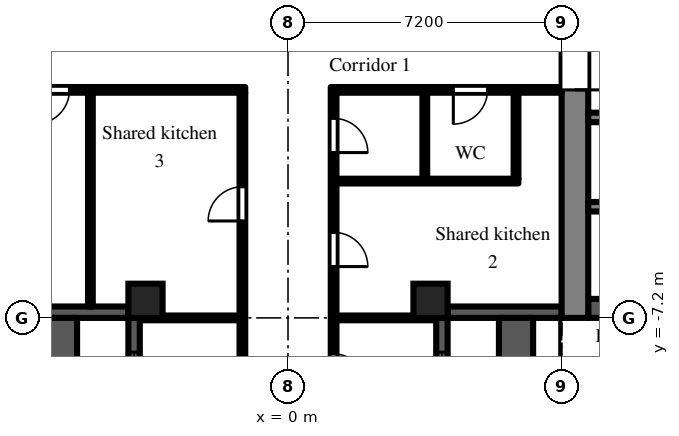
"""IFC4 building model, lengths in metres.
Left out: names, types, materials, properties, quantities, classifications, styles, units other than length and angle.
Written with IfcOpenShell. Run it as: python <this file> out.ifc"""

import sys

from ifc_helpers import new_model, si_unit, direction, frame, frame_2d, origin, origin_2d, place, context, subcontext, project, spatial, rectangle, extrude, element, fill, save


model = new_model("IFC4")
c1 = context("Model", 3, precision=1e-05, world=origin(), true_north=direction((0.0, 1.0)))
c2 = subcontext(c1, "Body", "Model", "MODEL_VIEW")
j1 = project(units=[si_unit("LENGTHUNIT", "METRE"), si_unit("PLANEANGLEUNIT", "RADIAN")], contexts=[c1])
p1 = place(None, origin())
s1 = spatial("IfcSite", under=j1, at=p1, CompositionType="ELEMENT")
p2 = place(p1, origin())
s2 = spatial("IfcBuilding", under=s1, at=p2, CompositionType="ELEMENT")
p3 = place(p2, frame((0.0, 0.0, 93.9)))
s3 = spatial("IfcBuildingStorey", under=s2, at=p3, CompositionType="ELEMENT", Elevation=93.9)
for number, where, z_axis, x_axis in (
    (1, (-3.75, -6.75, 0.0), (0.0, 0.0, 1.0), (1.0, 0.0, 0.0)),
    (2, (3.75, -6.75, 0.0), (0.0, 0.0, 1.0), (1.0, 0.0, 0.0)),
):
    element("IfcColumn", number, at=place(p3, frame(where, z_axis=z_axis, x_axis=x_axis)), inside=s3, PredefinedType="COLUMN", context=c2, shape_type="SweptSolid", body=[
        extrude(rectangle(XDim=0.9, YDim=0.9, at=origin_2d()), origin(), (0.0, 0.0, 1.0), 3.0),
    ])
p4 = place(p3, frame((-7.2, -7.05, 0.0), z_axis=(0.0, 0.0, 1.0), x_axis=(1.0, 0.0, 0.0)))
e3 = element("IfcWall", 3, at=p4, inside=s3, PredefinedType="SOLIDWALL", context=c2, shape_type="SweptSolid", body=[
    extrude(rectangle(XDim=3.0, YDim=0.3, at=frame_2d((1.5, 0.0))), origin(), (0.0, 0.0, 1.0), 2.1),
])
p5 = place(p3, frame((-4.05, -7.2, 0.0), z_axis=(0.0, 0.0, 1.0), x_axis=(0.0, -1.0, 0.0)))
e4 = element("IfcWall", 4, at=p5, inside=s3, PredefinedType="SOLIDWALL", context=c2, shape_type="SweptSolid", body=[
    extrude(rectangle(XDim=7.2, YDim=0.3, at=frame_2d((3.6, 0.0))), origin(), (0.0, 0.0, 1.0), 2.1),
])
p6 = place(p5, frame((3.0, 0.0, 0.0)))
e5 = element("IfcOpeningElement", 5, at=p6, cuts=e4, PredefinedType="OPENING", context=c2, shape_type="SweptSolid", body=[
    extrude(rectangle(XDim=1.2, YDim=2.05, at=frame_2d((0.6, 1.025))), frame((0.0, 0.16, 0.0), z_axis=(0.0, -1.0, 0.0), x_axis=(1.0, 0.0, 0.0)), (0.0, 0.0, 1.0), 0.32),
])
p7 = place(p5, frame((0.9, 0.0, 0.2)))
e6 = element("IfcOpeningElement", 6, at=p7, cuts=e4, PredefinedType="OPENING", context=c2, shape_type="SweptSolid", body=[
    extrude(rectangle(XDim=1.8, YDim=1.85, at=frame_2d((0.9, 0.925))), frame((0.0, 0.16, 0.0), z_axis=(0.0, -1.0, 0.0), x_axis=(1.0, 0.0, 0.0)), (0.0, 0.0, 1.0), 0.32),
])
p8 = place(p5, frame((4.5, 0.0, 0.2)))
e7 = element("IfcOpeningElement", 7, at=p8, cuts=e4, PredefinedType="OPENING", context=c2, shape_type="SweptSolid", body=[
    extrude(rectangle(XDim=1.8, YDim=1.85, at=frame_2d((0.9, 0.925))), frame((0.0, 0.16, 0.0), z_axis=(0.0, -1.0, 0.0), x_axis=(1.0, 0.0, 0.0)), (0.0, 0.0, 1.0), 0.32),
])
p9 = place(p3, frame((4.05, -14.4, 0.0), z_axis=(0.0, 0.0, 1.0), x_axis=(0.0, 1.0, 0.0)))
e8 = element("IfcWall", 8, at=p9, inside=s3, PredefinedType="SOLIDWALL", context=c2, shape_type="SweptSolid", body=[
    extrude(rectangle(XDim=7.2, YDim=0.3, at=frame_2d((3.6, 0.0))), origin(), (0.0, 0.0, 1.0), 2.1),
])
p10 = place(p9, frame((3.0, 0.0, 0.0)))
e9 = element("IfcOpeningElement", 9, at=p10, cuts=e8, PredefinedType="OPENING", context=c2, shape_type="SweptSolid", body=[
    extrude(rectangle(XDim=1.2, YDim=2.05, at=frame_2d((0.6, 1.025))), frame((0.0, 0.16, 0.0), z_axis=(0.0, -1.0, 0.0), x_axis=(1.0, 0.0, 0.0)), (0.0, 0.0, 1.0), 0.32),
])
p11 = place(p9, frame((0.9, 0.0, 0.2)))
e10 = element("IfcOpeningElement", 10, at=p11, cuts=e8, PredefinedType="OPENING", context=c2, shape_type="SweptSolid", body=[
    extrude(rectangle(XDim=1.8, YDim=1.85, at=frame_2d((0.9, 0.925))), frame((0.0, 0.16, 0.0), z_axis=(0.0, -1.0, 0.0), x_axis=(1.0, 0.0, 0.0)), (0.0, 0.0, 1.0), 0.32),
])
p12 = place(p9, frame((4.5, 0.0, 0.2)))
e11 = element("IfcOpeningElement", 11, at=p12, cuts=e8, PredefinedType="OPENING", context=c2, shape_type="SweptSolid", body=[
    extrude(rectangle(XDim=1.8, YDim=1.85, at=frame_2d((0.9, 0.925))), frame((0.0, 0.16, 0.0), z_axis=(0.0, -1.0, 0.0), x_axis=(1.0, 0.0, 0.0)), (0.0, 0.0, 1.0), 0.32),
])
p13 = place(p3, frame((4.2, -7.05, 0.0), z_axis=(0.0, 0.0, 1.0), x_axis=(1.0, 0.0, 0.0)))
e12 = element("IfcWall", 12, at=p13, inside=s3, PredefinedType="SOLIDWALL", context=c2, shape_type="SweptSolid", body=[
    extrude(rectangle(XDim=3.0, YDim=0.3, at=frame_2d((1.5, 0.0))), origin(), (0.0, 0.0, 1.0), 2.1),
])
for number, where, z_axis, x_axis in (
    (13, (6.0, -14.4, 0.0), (0.0, 0.0, 1.0), (0.0, 1.0, 0.0)),
    (14, (-6.0, -14.4, 0.0), (0.0, 0.0, 1.0), (0.0, 1.0, 0.0)),
):
    element("IfcWall", number, at=place(p3, frame(where, z_axis=z_axis, x_axis=x_axis)), inside=s3, PredefinedType="PARAPET", context=c2, shape_type="SweptSolid", body=[
        extrude(rectangle(XDim=7.2, YDim=0.9, at=frame_2d((3.6, 0.0))), origin(), (0.0, 0.0, 1.0), 0.8),
    ])
p14 = place(p3, frame((7.55, -7.2, 0.0), z_axis=(0.0, 0.0, 1.0), x_axis=(0.0, 1.0, 0.0)))
e15 = element("IfcWall", 15, at=p14, inside=s3, PredefinedType="SHEAR", context=c2, shape_type="SweptSolid", body=[
    extrude(rectangle(XDim=14.4, YDim=0.7, at=frame_2d((7.2, 0.0))), origin(), (0.0, 0.0, 1.0), 2.575),
])
p15 = place(p14, frame((6.0, 0.0, 0.0)))
e16 = element("IfcOpeningElement", 16, at=p15, cuts=e15, PredefinedType="OPENING", context=c2, shape_type="SweptSolid", body=[
    extrude(rectangle(XDim=2.4, YDim=2.2, at=frame_2d((1.2, 1.1))), frame((0.0, 0.36, 0.0), z_axis=(0.0, -1.0, 0.0), x_axis=(1.0, 0.0, 0.0)), (0.0, 0.0, 1.0), 0.72),
])
p16 = place(p3, frame((7.9, -6.95, 0.0), z_axis=(0.0, 0.0, 1.0), x_axis=(1.0, 0.0, 0.0)))
e17 = element("IfcWall", 17, at=p16, inside=s3, PredefinedType="SHEAR", context=c2, shape_type="SweptSolid", body=[
    extrude(rectangle(XDim=12.95, YDim=0.5, at=frame_2d((6.475, 0.0))), origin(), (0.0, 0.0, 1.0), 2.575),
])
p17 = place(p3, frame((7.9, -1.925, 0.0), z_axis=(0.0, 0.0, 1.0), x_axis=(1.0, 0.0, 0.0)))
e18 = element("IfcWall", 18, at=p17, inside=s3, PredefinedType="SHEAR", context=c2, shape_type="SweptSolid", body=[
    extrude(rectangle(XDim=12.95, YDim=0.25, at=frame_2d((6.475, 0.0))), origin(), (0.0, 0.0, 1.0), 2.575),
])
p18 = place(p17, frame((4.825, 0.0, 0.0)))
e19 = element("IfcOpeningElement", 19, at=p18, cuts=e18, PredefinedType="OPENING", context=c2, shape_type="SweptSolid", body=[
    extrude(rectangle(XDim=1.1, YDim=2.1, at=frame_2d((0.55, 1.05))), frame((0.0, 0.135, 0.0), z_axis=(0.0, -1.0, 0.0), x_axis=(1.0, 0.0, 0.0)), (0.0, 0.0, 1.0), 0.27),
])
p19 = place(p17, frame((7.025, 0.0, 0.0)))
e20 = element("IfcOpeningElement", 20, at=p19, cuts=e18, PredefinedType="OPENING", context=c2, shape_type="SweptSolid", body=[
    extrude(rectangle(XDim=1.1, YDim=2.1, at=frame_2d((0.55, 1.05))), frame((0.0, 0.135, 0.0), z_axis=(0.0, -1.0, 0.0), x_axis=(1.0, 0.0, 0.0)), (0.0, 0.0, 1.0), 0.27),
])
p20 = place(p17, frame((9.225, 0.0, 0.0)))
e21 = element("IfcOpeningElement", 21, at=p20, cuts=e18, PredefinedType="OPENING", context=c2, shape_type="SweptSolid", body=[
    extrude(rectangle(XDim=1.1, YDim=2.1, at=frame_2d((0.55, 1.05))), frame((0.0, 0.135, 0.0), z_axis=(0.0, -1.0, 0.0), x_axis=(1.0, 0.0, 0.0)), (0.0, 0.0, 1.0), 0.27),
])
p21 = place(p17, frame((0.525, 0.0, 0.0)))
e22 = element("IfcOpeningElement", 22, at=p21, cuts=e18, PredefinedType="OPENING", context=c2, shape_type="SweptSolid", body=[
    extrude(rectangle(XDim=0.9, YDim=2.1, at=frame_2d((0.45, 1.05))), frame((0.0, 0.135, 0.0), z_axis=(0.0, -1.0, 0.0), x_axis=(1.0, 0.0, 0.0)), (0.0, 0.0, 1.0), 0.27),
])
p22 = place(p17, frame((2.625, 0.0, 0.0)))
e23 = element("IfcOpeningElement", 23, at=p22, cuts=e18, PredefinedType="OPENING", context=c2, shape_type="SweptSolid", body=[
    extrude(rectangle(XDim=1.1, YDim=2.1, at=frame_2d((0.55, 1.05))), frame((0.0, 0.135, 0.0), z_axis=(0.0, -1.0, 0.0), x_axis=(1.0, 0.0, 0.0)), (0.0, 0.0, 1.0), 0.27),
])
p23 = place(p3, frame((7.9, -4.275, 0.0), z_axis=(0.0, 0.0, 1.0), x_axis=(1.0, 0.0, 0.0)))
e24 = element("IfcWall", 24, at=p23, inside=s3, PredefinedType="SHEAR", context=c2, shape_type="SweptSolid", body=[
    extrude(rectangle(XDim=1.95, YDim=0.25, at=frame_2d((0.975, 0.0))), origin(), (0.0, 0.0, 1.0), 2.575),
])
p24 = place(p3, frame((-7.2, -1.2, 0.0), z_axis=(0.0, 0.0, 1.0), x_axis=(1.0, 0.0, 0.0)))
e25 = element("IfcWall", 25, at=p24, inside=s3, PredefinedType="PARTITIONING", context=c2, shape_type="SweptSolid", body=[
    extrude(rectangle(XDim=6.075, YDim=0.15, at=frame_2d((3.038, 0.0))), origin(), (0.0, 0.0, 1.0), 2.575),
])
p25 = place(p24, frame((0.55, 0.0, 0.0)))
e26 = element("IfcOpeningElement", 26, at=p25, cuts=e25, PredefinedType="OPENING", context=c2, shape_type="SweptSolid", body=[
    extrude(rectangle(XDim=0.9, YDim=2.1, at=frame_2d((0.45, 1.05))), frame((0.0, 0.085, 0.0), z_axis=(0.0, -1.0, 0.0), x_axis=(1.0, 0.0, 0.0)), (0.0, 0.0, 1.0), 0.17),
])
p26 = place(p3, frame((-5.2, -6.9, 0.0), z_axis=(0.0, 0.0, 1.0), x_axis=(0.0, 1.0, 0.0)))
e27 = element("IfcWall", 27, at=p26, inside=s3, PredefinedType="PARTITIONING", context=c2, shape_type="SweptSolid", body=[
    extrude(rectangle(XDim=5.625, YDim=0.125, at=frame_2d((2.812, 0.0))), origin(), (0.0, 0.0, 1.0), 2.575),
])
p27 = place(p3, frame((-3.9, -7.2, 0.0), z_axis=(0.0, 0.0, 1.0), x_axis=(1.0, 0.0, 0.0)))
e28 = element("IfcWall", 28, at=p27, inside=s3, PredefinedType="PARTITIONING", context=c2, shape_type="SweptSolid", body=[
    extrude(rectangle(XDim=2.625, YDim=0.125, at=frame_2d((1.312, 0.0))), origin(), (0.0, 0.0, 1.0), 2.575),
])
p28 = place(p3, frame((-1.2, -36.5, 0.0), z_axis=(0.0, 0.0, 1.0), x_axis=(0.0, 1.0, 0.0)))
e29 = element("IfcWall", 29, at=p28, inside=s3, PredefinedType="PARTITIONING", context=c2, shape_type="SweptSolid", body=[
    extrude(rectangle(XDim=35.225, YDim=0.15, at=frame_2d((17.613, 0.0))), origin(), (0.0, 0.0, 1.0), 2.575),
])
p29 = place(p28, frame((31.85, 0.0, 0.0)))
e30 = element("IfcOpeningElement", 30, at=p29, cuts=e29, PredefinedType="OPENING", context=c2, shape_type="SweptSolid", body=[
    extrude(rectangle(XDim=0.9, YDim=2.1, at=frame_2d((0.45, 1.05))), frame((0.0, 0.085, 0.0), z_axis=(0.0, -1.0, 0.0), x_axis=(1.0, 0.0, 0.0)), (0.0, 0.0, 1.0), 0.17),
])
p30 = place(p28, frame((27.05, 0.0, 0.0)))
e31 = element("IfcOpeningElement", 31, at=p30, cuts=e29, PredefinedType="OPENING", context=c2, shape_type="SweptSolid", body=[
    extrude(rectangle(XDim=0.9, YDim=2.1, at=frame_2d((0.45, 1.05))), frame((0.0, 0.085, 0.0), z_axis=(0.0, -1.0, 0.0), x_axis=(1.0, 0.0, 0.0)), (0.0, 0.0, 1.0), 0.17),
])
p31 = place(p28, frame((1.55, 0.0, 0.0)))
e32 = element("IfcOpeningElement", 32, at=p31, cuts=e29, PredefinedType="OPENING", context=c2, shape_type="SweptSolid", body=[
    extrude(rectangle(XDim=1.0, YDim=2.1, at=frame_2d((0.5, 1.05))), frame((0.0, 0.085, 0.0), z_axis=(0.0, -1.0, 0.0), x_axis=(1.0, 0.0, 0.0)), (0.0, 0.0, 1.0), 0.17),
])
p32 = place(p3, frame((1.2, -36.5, 0.0), z_axis=(0.0, 0.0, 1.0), x_axis=(0.0, 1.0, 0.0)))
e33 = element("IfcWall", 33, at=p32, inside=s3, PredefinedType="PARTITIONING", context=c2, shape_type="SweptSolid", body=[
    extrude(rectangle(XDim=35.375, YDim=0.15, at=frame_2d((17.688, 0.0))), origin(), (0.0, 0.0, 1.0), 2.575),
])
p33 = place(p32, frame((33.65, 0.0, 0.0)))
e34 = element("IfcOpeningElement", 34, at=p33, cuts=e33, PredefinedType="OPENING", context=c2, shape_type="SweptSolid", body=[
    extrude(rectangle(XDim=0.9, YDim=2.1, at=frame_2d((0.45, 1.05))), frame((0.0, 0.085, 0.0), z_axis=(0.0, -1.0, 0.0), x_axis=(1.0, 0.0, 0.0)), (0.0, 0.0, 1.0), 0.17),
])
p34 = place(p32, frame((30.65, 0.0, 0.0)))
e35 = element("IfcOpeningElement", 35, at=p34, cuts=e33, PredefinedType="OPENING", context=c2, shape_type="SweptSolid", body=[
    extrude(rectangle(XDim=0.9, YDim=2.1, at=frame_2d((0.45, 1.05))), frame((0.0, 0.085, 0.0), z_axis=(0.0, -1.0, 0.0), x_axis=(1.0, 0.0, 0.0)), (0.0, 0.0, 1.0), 0.17),
])
p35 = place(p32, frame((27.45, 0.0, 0.0)))
e36 = element("IfcOpeningElement", 36, at=p35, cuts=e33, PredefinedType="OPENING", context=c2, shape_type="SweptSolid", body=[
    extrude(rectangle(XDim=0.9, YDim=2.1, at=frame_2d((0.45, 1.05))), frame((0.0, 0.085, 0.0), z_axis=(0.0, -1.0, 0.0), x_axis=(1.0, 0.0, 0.0)), (0.0, 0.0, 1.0), 0.17),
])
p36 = place(p32, frame((23.85, 0.0, 0.0)))
e37 = element("IfcOpeningElement", 37, at=p36, cuts=e33, PredefinedType="OPENING", context=c2, shape_type="SweptSolid", body=[
    extrude(rectangle(XDim=0.9, YDim=2.1, at=frame_2d((0.45, 1.05))), frame((0.0, 0.085, 0.0), z_axis=(0.0, -1.0, 0.0), x_axis=(1.0, 0.0, 0.0)), (0.0, 0.0, 1.0), 0.17),
])
p37 = place(p32, frame((1.55, 0.0, 0.0)))
e38 = element("IfcOpeningElement", 38, at=p37, cuts=e33, PredefinedType="OPENING", context=c2, shape_type="SweptSolid", body=[
    extrude(rectangle(XDim=1.0, YDim=2.1, at=frame_2d((0.5, 1.05))), frame((0.0, 0.085, 0.0), z_axis=(0.0, -1.0, 0.0), x_axis=(1.0, 0.0, 0.0)), (0.0, 0.0, 1.0), 0.17),
])
p38 = place(p3, frame((1.275, -7.2, 0.0), z_axis=(0.0, 0.0, 1.0), x_axis=(1.0, 0.0, 0.0)))
e39 = element("IfcWall", 39, at=p38, inside=s3, PredefinedType="PARTITIONING", context=c2, shape_type="SweptSolid", body=[
    extrude(rectangle(XDim=2.625, YDim=0.125, at=frame_2d((1.312, 0.0))), origin(), (0.0, 0.0, 1.0), 2.575),
])
p39 = place(p3, frame((1.275, -3.6, 0.0), z_axis=(0.0, 0.0, 1.0), x_axis=(1.0, 0.0, 0.0)))
e40 = element("IfcWall", 40, at=p39, inside=s3, PredefinedType="PARTITIONING", context=c2, shape_type="SweptSolid", body=[
    extrude(rectangle(XDim=4.788, YDim=0.125, at=frame_2d((2.394, 0.0))), origin(), (0.0, 0.0, 1.0), 2.575),
])
p40 = place(p3, frame((1.275, -1.2, 0.0), z_axis=(0.0, 0.0, 1.0), x_axis=(1.0, 0.0, 0.0)))
e41 = element("IfcWall", 41, at=p40, inside=s3, PredefinedType="PARTITIONING", context=c2, shape_type="SweptSolid", body=[
    extrude(rectangle(XDim=5.925, YDim=0.15, at=frame_2d((2.962, 0.0))), origin(), (0.0, 0.0, 1.0), 2.575),
])
p41 = place(p40, frame((3.075, 0.0, 0.0)))
e42 = element("IfcOpeningElement", 42, at=p41, cuts=e41, PredefinedType="OPENING", context=c2, shape_type="SweptSolid", body=[
    extrude(rectangle(XDim=0.9, YDim=2.1, at=frame_2d((0.45, 1.05))), frame((0.0, 0.085, 0.0), z_axis=(0.0, -1.0, 0.0), x_axis=(1.0, 0.0, 0.0)), (0.0, 0.0, 1.0), 0.17),
])
for number, where, z_axis, x_axis in (
    (43, (3.6, -3.538, 0.0), (0.0, 0.0, 1.0), (0.0, 1.0, 0.0)),
    (44, (6.0, -3.538, 0.0), (0.0, 0.0, 1.0), (0.0, 1.0, 0.0)),
):
    element("IfcWall", number, at=place(p3, frame(where, z_axis=z_axis, x_axis=x_axis)), inside=s3, PredefinedType="PARTITIONING", context=c2, shape_type="SweptSolid", body=[
        extrude(rectangle(XDim=2.263, YDim=0.125, at=frame_2d((1.131, 0.0))), origin(), (0.0, 0.0, 1.0), 2.575),
    ])
p42 = place(p7, origin())
e45 = element("IfcWindow", 45, at=p42, inside=s3, PartitioningType="SINGLE_PANEL", PredefinedType="WINDOW", context=c2, shape_type="SweptSolid", body=[
    extrude(rectangle(XDim=1.8, YDim=1.85, at=frame_2d((0.9, 0.925))), frame((0.0, 0.03, 0.0), z_axis=(0.0, -1.0, 0.0), x_axis=(1.0, 0.0, 0.0)), (0.0, 0.0, 1.0), 0.06),
])
fill(e6, e45)
p43 = place(p12, origin())
e46 = element("IfcWindow", 46, at=p43, inside=s3, PartitioningType="SINGLE_PANEL", PredefinedType="WINDOW", context=c2, shape_type="SweptSolid", body=[
    extrude(rectangle(XDim=1.8, YDim=1.85, at=frame_2d((0.9, 0.925))), frame((0.0, 0.03, 0.0), z_axis=(0.0, -1.0, 0.0), x_axis=(1.0, 0.0, 0.0)), (0.0, 0.0, 1.0), 0.06),
])
fill(e11, e46)
p44 = place(p15, frame((2.4, 0.0, 0.0), z_axis=(0.0, 0.0, 1.0), x_axis=(-1.0, 0.0, 0.0)))
e47 = element("IfcDoor", 47, at=p44, inside=s3, OperationType="DOUBLE_DOOR_DOUBLE_SWING", PredefinedType="DOOR", context=c2, shape_type="SweptSolid", body=[
    extrude(rectangle(XDim=2.4, YDim=2.2, at=frame_2d((1.2, 1.1))), frame((0.0, 0.025, 0.0), z_axis=(0.0, -1.0, 0.0), x_axis=(1.0, 0.0, 0.0)), (0.0, 0.0, 1.0), 0.05),
])
fill(e16, e47)
p45 = place(p33, frame((0.9, 0.0, 0.0), z_axis=(0.0, 0.0, 1.0), x_axis=(-1.0, 0.0, 0.0)))
e48 = element("IfcDoor", 48, at=p45, inside=s3, OperationType="SINGLE_SWING_RIGHT", PredefinedType="DOOR", context=c2, shape_type="SweptSolid", body=[
    extrude(rectangle(XDim=0.9, YDim=2.1, at=frame_2d((0.45, 1.05))), frame((0.0, 0.025, 0.0), z_axis=(0.0, -1.0, 0.0), x_axis=(1.0, 0.0, 0.0)), (0.0, 0.0, 1.0), 0.05),
])
fill(e34, e48)
p46 = place(p41, frame((0.9, 0.0, 0.0), z_axis=(0.0, 0.0, 1.0), x_axis=(-1.0, 0.0, 0.0)))
e49 = element("IfcDoor", 49, at=p46, inside=s3, OperationType="SINGLE_SWING_RIGHT", PredefinedType="DOOR", context=c2, shape_type="SweptSolid", body=[
    extrude(rectangle(XDim=0.9, YDim=2.1, at=frame_2d((0.45, 1.05))), frame((0.0, 0.025, 0.0), z_axis=(0.0, -1.0, 0.0), x_axis=(1.0, 0.0, 0.0)), (0.0, 0.0, 1.0), 0.05),
])
fill(e42, e49)
p47 = place(p34, frame((0.9, 0.0, 0.0), z_axis=(0.0, 0.0, 1.0), x_axis=(-1.0, 0.0, 0.0)))
e50 = element("IfcDoor", 50, at=p47, inside=s3, OperationType="SINGLE_SWING_RIGHT", PredefinedType="DOOR", context=c2, shape_type="SweptSolid", body=[
    extrude(rectangle(XDim=0.9, YDim=2.1, at=frame_2d((0.45, 1.05))), frame((0.0, 0.025, 0.0), z_axis=(0.0, -1.0, 0.0), x_axis=(1.0, 0.0, 0.0)), (0.0, 0.0, 1.0), 0.05),
])
fill(e35, e50)
p48 = place(p29, origin())
e51 = element("IfcDoor", 51, at=p48, inside=s3, OperationType="SINGLE_SWING_LEFT", PredefinedType="DOOR", context=c2, shape_type="SweptSolid", body=[
    extrude(rectangle(XDim=0.9, YDim=2.1, at=frame_2d((0.45, 1.05))), frame((0.0, 0.025, 0.0), z_axis=(0.0, -1.0, 0.0), x_axis=(1.0, 0.0, 0.0)), (0.0, 0.0, 1.0), 0.05),
])
fill(e30, e51)
p49 = place(p25, frame((0.9, 0.0, 0.0), z_axis=(0.0, 0.0, 1.0), x_axis=(-1.0, 0.0, 0.0)))
e52 = element("IfcDoor", 52, at=p49, inside=s3, OperationType="SINGLE_SWING_RIGHT", PredefinedType="DOOR", context=c2, shape_type="SweptSolid", body=[
    extrude(rectangle(XDim=0.9, YDim=2.1, at=frame_2d((0.45, 1.05))), frame((0.0, 0.025, 0.0), z_axis=(0.0, -1.0, 0.0), x_axis=(1.0, 0.0, 0.0)), (0.0, 0.0, 1.0), 0.05),
])
fill(e26, e52)
p50 = place(p35, frame((0.9, 0.0, 0.0), z_axis=(0.0, 0.0, 1.0), x_axis=(-1.0, 0.0, 0.0)))
e53 = element("IfcDoor", 53, at=p50, inside=s3, OperationType="SINGLE_SWING_RIGHT", PredefinedType="DOOR", context=c2, shape_type="SweptSolid", body=[
    extrude(rectangle(XDim=0.9, YDim=2.1, at=frame_2d((0.45, 1.05))), frame((0.0, 0.025, 0.0), z_axis=(0.0, -1.0, 0.0), x_axis=(1.0, 0.0, 0.0)), (0.0, 0.0, 1.0), 0.05),
])
fill(e36, e53)
save(model, sys.argv[1])
